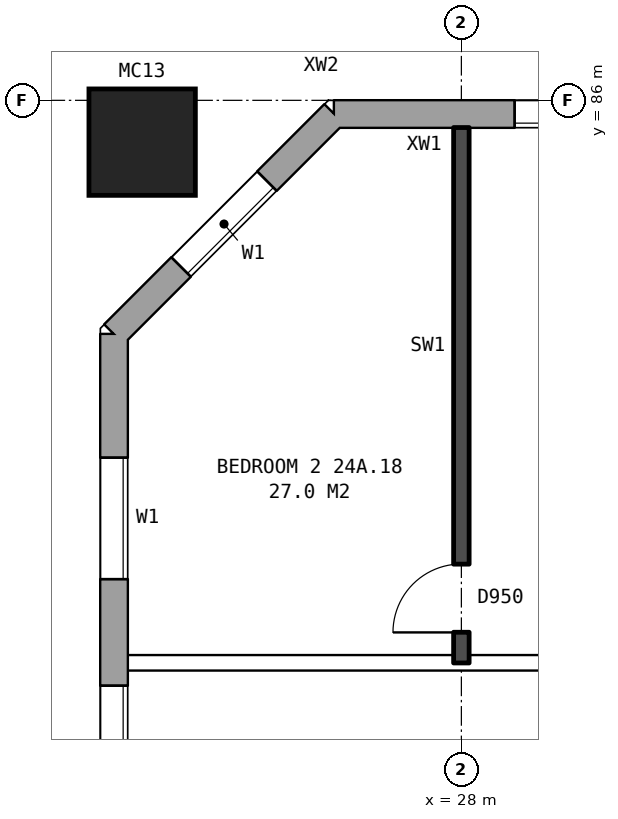
"""IFC4 building model, lengths in metres.
Left out: names, types, materials, properties, quantities, classifications, styles, units other than length and angle.
Written with IfcOpenShell. Run it as: python <this file> out.ifc"""

import sys

from ifc_helpers import new_model, si_unit, direction, frame, frame_2d, origin, origin_2d, place, context, subcontext, project, spatial, rectangle, hollow_rectangle, extrude, element, fill, save


model = new_model("IFC4")
c1 = context("Model", 3, precision=1e-05, world=origin(), true_north=direction((0.0, 1.0)))
c2 = subcontext(c1, "Body", "Model", "MODEL_VIEW")
j1 = project(units=[si_unit("LENGTHUNIT", "METRE"), si_unit("PLANEANGLEUNIT", "RADIAN")], contexts=[c1])
p1 = place(None, origin())
s1 = spatial("IfcSite", under=j1, at=p1, CompositionType="ELEMENT")
p2 = place(p1, origin())
s2 = spatial("IfcBuilding", under=s1, at=p2, CompositionType="ELEMENT")
p3 = place(p2, frame((0.0, 0.0, 87.1)))
s3 = spatial("IfcBuildingStorey", under=s2, at=p3, CompositionType="ELEMENT", Elevation=87.1)
p4 = place(p3, frame((23.8, 85.45, 0.0), z_axis=(0.0, 0.0, 1.0), x_axis=(1.0, 0.0, 0.0)))
e1 = element("IfcColumn", 1, at=p4, inside=s3, PredefinedType="COLUMN", context=c2, shape_type="SweptSolid", body=[
    extrude(hollow_rectangle(XDim=1.4, YDim=1.4, WallThickness=0.075, at=origin_2d()), origin(), (0.0, 0.0, 1.0), 3.1),
])
p5 = place(p3, frame((72.925, 85.82, 0.0), z_axis=(0.0, 0.0, 1.0), x_axis=(-1.0, 0.0, 0.0)))
e2 = element("IfcWall", 2, at=p5, inside=s3, PredefinedType="STANDARD", context=c2, shape_type="SweptSolid", body=[
    extrude(rectangle(XDim=46.601, YDim=0.36, at=frame_2d((23.3, 0.0))), origin(), (0.0, 0.0, 1.0), 2.85),
])
p6 = place(p5, frame((0.625, 0.0, 0.8)))
e3 = element("IfcOpeningElement", 3, at=p6, cuts=e2, PredefinedType="OPENING", context=c2, shape_type="SweptSolid", body=[
    extrude(rectangle(XDim=1.6, YDim=1.8, at=frame_2d((0.8, 0.9))), frame((0.0, 0.19, 0.0), z_axis=(0.0, -1.0, 0.0), x_axis=(1.0, 0.0, 0.0)), (0.0, 0.0, 1.0), 0.38),
])
p7 = place(p5, frame((3.625, 0.0, 0.8)))
e4 = element("IfcOpeningElement", 4, at=p7, cuts=e2, PredefinedType="OPENING", context=c2, shape_type="SweptSolid", body=[
    extrude(rectangle(XDim=1.6, YDim=1.8, at=frame_2d((0.8, 0.9))), frame((0.0, 0.19, 0.0), z_axis=(0.0, -1.0, 0.0), x_axis=(1.0, 0.0, 0.0)), (0.0, 0.0, 1.0), 0.38),
])
p8 = place(p5, frame((6.625, 0.0, 0.8)))
e5 = element("IfcOpeningElement", 5, at=p8, cuts=e2, PredefinedType="OPENING", context=c2, shape_type="SweptSolid", body=[
    extrude(rectangle(XDim=1.6, YDim=1.8, at=frame_2d((0.8, 0.9))), frame((0.0, 0.19, 0.0), z_axis=(0.0, -1.0, 0.0), x_axis=(1.0, 0.0, 0.0)), (0.0, 0.0, 1.0), 0.38),
])
p9 = place(p5, frame((9.625, 0.0, 0.8)))
e6 = element("IfcOpeningElement", 6, at=p9, cuts=e2, PredefinedType="OPENING", context=c2, shape_type="SweptSolid", body=[
    extrude(rectangle(XDim=1.6, YDim=1.8, at=frame_2d((0.8, 0.9))), frame((0.0, 0.19, 0.0), z_axis=(0.0, -1.0, 0.0), x_axis=(1.0, 0.0, 0.0)), (0.0, 0.0, 1.0), 0.38),
])
p10 = place(p5, frame((12.625, 0.0, 0.8)))
e7 = element("IfcOpeningElement", 7, at=p10, cuts=e2, PredefinedType="OPENING", context=c2, shape_type="SweptSolid", body=[
    extrude(rectangle(XDim=1.6, YDim=1.8, at=frame_2d((0.8, 0.9))), frame((0.0, 0.19, 0.0), z_axis=(0.0, -1.0, 0.0), x_axis=(1.0, 0.0, 0.0)), (0.0, 0.0, 1.0), 0.38),
])
p11 = place(p5, frame((15.625, 0.0, 0.8)))
e8 = element("IfcOpeningElement", 8, at=p11, cuts=e2, PredefinedType="OPENING", context=c2, shape_type="SweptSolid", body=[
    extrude(rectangle(XDim=1.6, YDim=1.8, at=frame_2d((0.8, 0.9))), frame((0.0, 0.19, 0.0), z_axis=(0.0, -1.0, 0.0), x_axis=(1.0, 0.0, 0.0)), (0.0, 0.0, 1.0), 0.38),
])
p12 = place(p5, frame((18.625, 0.0, 0.8)))
e9 = element("IfcOpeningElement", 9, at=p12, cuts=e2, PredefinedType="OPENING", context=c2, shape_type="SweptSolid", body=[
    extrude(rectangle(XDim=1.6, YDim=1.8, at=frame_2d((0.8, 0.9))), frame((0.0, 0.19, 0.0), z_axis=(0.0, -1.0, 0.0), x_axis=(1.0, 0.0, 0.0)), (0.0, 0.0, 1.0), 0.38),
])
p13 = place(p5, frame((22.025, 0.0, 0.15)))
e10 = element("IfcOpeningElement", 10, at=p13, cuts=e2, PredefinedType="OPENING", context=c2, shape_type="SweptSolid", body=[
    extrude(rectangle(XDim=0.6, YDim=0.9, at=frame_2d((0.3, 0.45))), frame((0.0, 0.19, 0.0), z_axis=(0.0, -1.0, 0.0), x_axis=(1.0, 0.0, 0.0)), (0.0, 0.0, 1.0), 0.38),
])
p14 = place(p5, frame((25.475, 0.0, 1.4)))
e11 = element("IfcOpeningElement", 11, at=p14, cuts=e2, PredefinedType="OPENING", context=c2, shape_type="SweptSolid", body=[
    extrude(rectangle(XDim=1.2, YDim=1.2, at=frame_2d((0.6, 0.6))), frame((0.0, 0.19, 0.0), z_axis=(0.0, -1.0, 0.0), x_axis=(1.0, 0.0, 0.0)), (0.0, 0.0, 1.0), 0.38),
])
p15 = place(p5, frame((27.625, 0.0, 0.8)))
e12 = element("IfcOpeningElement", 12, at=p15, cuts=e2, PredefinedType="OPENING", context=c2, shape_type="SweptSolid", body=[
    extrude(rectangle(XDim=1.6, YDim=1.8, at=frame_2d((0.8, 0.9))), frame((0.0, 0.19, 0.0), z_axis=(0.0, -1.0, 0.0), x_axis=(1.0, 0.0, 0.0)), (0.0, 0.0, 1.0), 0.38),
])
p16 = place(p5, frame((30.625, 0.0, 0.8)))
e13 = element("IfcOpeningElement", 13, at=p16, cuts=e2, PredefinedType="OPENING", context=c2, shape_type="SweptSolid", body=[
    extrude(rectangle(XDim=1.6, YDim=1.8, at=frame_2d((0.8, 0.9))), frame((0.0, 0.19, 0.0), z_axis=(0.0, -1.0, 0.0), x_axis=(1.0, 0.0, 0.0)), (0.0, 0.0, 1.0), 0.38),
])
p17 = place(p5, frame((33.625, 0.0, 0.8)))
e14 = element("IfcOpeningElement", 14, at=p17, cuts=e2, PredefinedType="OPENING", context=c2, shape_type="SweptSolid", body=[
    extrude(rectangle(XDim=1.6, YDim=1.8, at=frame_2d((0.8, 0.9))), frame((0.0, 0.19, 0.0), z_axis=(0.0, -1.0, 0.0), x_axis=(1.0, 0.0, 0.0)), (0.0, 0.0, 1.0), 0.38),
])
p18 = place(p5, frame((36.625, 0.0, 0.8)))
e15 = element("IfcOpeningElement", 15, at=p18, cuts=e2, PredefinedType="OPENING", context=c2, shape_type="SweptSolid", body=[
    extrude(rectangle(XDim=1.6, YDim=1.8, at=frame_2d((0.8, 0.9))), frame((0.0, 0.19, 0.0), z_axis=(0.0, -1.0, 0.0), x_axis=(1.0, 0.0, 0.0)), (0.0, 0.0, 1.0), 0.38),
])
p19 = place(p5, frame((39.625, 0.0, 0.8)))
e16 = element("IfcOpeningElement", 16, at=p19, cuts=e2, PredefinedType="OPENING", context=c2, shape_type="SweptSolid", body=[
    extrude(rectangle(XDim=1.6, YDim=1.8, at=frame_2d((0.8, 0.9))), frame((0.0, 0.19, 0.0), z_axis=(0.0, -1.0, 0.0), x_axis=(1.0, 0.0, 0.0)), (0.0, 0.0, 1.0), 0.38),
])
p20 = place(p5, frame((42.625, 0.0, 0.8)))
e17 = element("IfcOpeningElement", 17, at=p20, cuts=e2, PredefinedType="OPENING", context=c2, shape_type="SweptSolid", body=[
    extrude(rectangle(XDim=1.6, YDim=1.8, at=frame_2d((0.8, 0.9))), frame((0.0, 0.19, 0.0), z_axis=(0.0, -1.0, 0.0), x_axis=(1.0, 0.0, 0.0)), (0.0, 0.0, 1.0), 0.38),
])
p21 = place(p5, frame((22.925, 0.0, 0.25)))
e18 = element("IfcOpeningElement", 18, at=p21, cuts=e2, PredefinedType="OPENING", context=c2, shape_type="SweptSolid", body=[
    extrude(rectangle(XDim=0.8, YDim=1.5, at=frame_2d((0.4, 0.75))), frame((0.0, 0.19, 0.0), z_axis=(0.0, -1.0, 0.0), x_axis=(1.0, 0.0, 0.0)), (0.0, 0.0, 1.0), 0.38),
])
p22 = place(p3, frame((26.325, 85.82, 0.0), z_axis=(0.0, 0.0, 1.0), x_axis=(-0.707106781187, -0.707106781187, 0.0)))
e19 = element("IfcWall", 19, at=p22, inside=s3, PredefinedType="STANDARD", context=c2, shape_type="SweptSolid", body=[
    extrude(rectangle(XDim=4.094, YDim=0.36, at=frame_2d((2.047, 0.0))), origin(), (0.0, 0.0, 1.0), 2.85),
])
p23 = place(p22, frame((1.247, 0.0, 0.8)))
e20 = element("IfcOpeningElement", 20, at=p23, cuts=e19, PredefinedType="OPENING", context=c2, shape_type="SweptSolid", body=[
    extrude(rectangle(XDim=1.6, YDim=1.8, at=frame_2d((0.8, 0.9))), frame((0.0, 0.19, 0.0), z_axis=(0.0, -1.0, 0.0), x_axis=(1.0, 0.0, 0.0)), (0.0, 0.0, 1.0), 0.38),
])
p24 = place(p3, frame((23.43, 82.925, 0.0), z_axis=(0.0, 0.0, 1.0), x_axis=(0.0, -1.0, 0.0)))
e21 = element("IfcWall", 21, at=p24, inside=s3, PredefinedType="STANDARD", context=c2, shape_type="SweptSolid", body=[
    extrude(rectangle(XDim=25.851, YDim=0.36, at=frame_2d((12.925, 0.0))), origin(), (0.0, 0.0, 1.0), 2.85),
])
p25 = place(p24, frame((1.625, 0.0, 0.8)))
e22 = element("IfcOpeningElement", 22, at=p25, cuts=e21, PredefinedType="OPENING", context=c2, shape_type="SweptSolid", body=[
    extrude(rectangle(XDim=1.6, YDim=1.8, at=frame_2d((0.8, 0.9))), frame((0.0, 0.19, 0.0), z_axis=(0.0, -1.0, 0.0), x_axis=(1.0, 0.0, 0.0)), (0.0, 0.0, 1.0), 0.38),
])
p26 = place(p24, frame((4.625, 0.0, 0.8)))
e23 = element("IfcOpeningElement", 23, at=p26, cuts=e21, PredefinedType="OPENING", context=c2, shape_type="SweptSolid", body=[
    extrude(rectangle(XDim=1.6, YDim=1.8, at=frame_2d((0.8, 0.9))), frame((0.0, 0.19, 0.0), z_axis=(0.0, -1.0, 0.0), x_axis=(1.0, 0.0, 0.0)), (0.0, 0.0, 1.0), 0.38),
])
p27 = place(p24, frame((7.625, 0.0, 0.8)))
e24 = element("IfcOpeningElement", 24, at=p27, cuts=e21, PredefinedType="OPENING", context=c2, shape_type="SweptSolid", body=[
    extrude(rectangle(XDim=1.6, YDim=1.8, at=frame_2d((0.8, 0.9))), frame((0.0, 0.19, 0.0), z_axis=(0.0, -1.0, 0.0), x_axis=(1.0, 0.0, 0.0)), (0.0, 0.0, 1.0), 0.38),
])
p28 = place(p24, frame((10.625, 0.0, 0.8)))
e25 = element("IfcOpeningElement", 25, at=p28, cuts=e21, PredefinedType="OPENING", context=c2, shape_type="SweptSolid", body=[
    extrude(rectangle(XDim=1.6, YDim=1.8, at=frame_2d((0.8, 0.9))), frame((0.0, 0.19, 0.0), z_axis=(0.0, -1.0, 0.0), x_axis=(1.0, 0.0, 0.0)), (0.0, 0.0, 1.0), 0.38),
])
p29 = place(p24, frame((13.625, 0.0, 0.8)))
e26 = element("IfcOpeningElement", 26, at=p29, cuts=e21, PredefinedType="OPENING", context=c2, shape_type="SweptSolid", body=[
    extrude(rectangle(XDim=1.6, YDim=1.8, at=frame_2d((0.8, 0.9))), frame((0.0, 0.19, 0.0), z_axis=(0.0, -1.0, 0.0), x_axis=(1.0, 0.0, 0.0)), (0.0, 0.0, 1.0), 0.38),
])
p30 = place(p24, frame((16.625, 0.0, 0.8)))
e27 = element("IfcOpeningElement", 27, at=p30, cuts=e21, PredefinedType="OPENING", context=c2, shape_type="SweptSolid", body=[
    extrude(rectangle(XDim=1.6, YDim=1.8, at=frame_2d((0.8, 0.9))), frame((0.0, 0.19, 0.0), z_axis=(0.0, -1.0, 0.0), x_axis=(1.0, 0.0, 0.0)), (0.0, 0.0, 1.0), 0.38),
])
p31 = place(p24, frame((19.625, 0.0, 0.8)))
e28 = element("IfcOpeningElement", 28, at=p31, cuts=e21, PredefinedType="OPENING", context=c2, shape_type="SweptSolid", body=[
    extrude(rectangle(XDim=1.6, YDim=1.8, at=frame_2d((0.8, 0.9))), frame((0.0, 0.19, 0.0), z_axis=(0.0, -1.0, 0.0), x_axis=(1.0, 0.0, 0.0)), (0.0, 0.0, 1.0), 0.38),
])
p32 = place(p24, frame((22.625, 0.0, 0.8)))
e29 = element("IfcOpeningElement", 29, at=p32, cuts=e21, PredefinedType="OPENING", context=c2, shape_type="SweptSolid", body=[
    extrude(rectangle(XDim=1.6, YDim=1.8, at=frame_2d((0.8, 0.9))), frame((0.0, 0.19, 0.0), z_axis=(0.0, -1.0, 0.0), x_axis=(1.0, 0.0, 0.0)), (0.0, 0.0, 1.0), 0.38),
])
p33 = place(p3, frame((23.61, 78.6, 0.0), z_axis=(0.0, 0.0, 1.0), x_axis=(1.0, 0.0, 0.0)))
e30 = element("IfcWall", 30, at=p33, inside=s3, PredefinedType="PARTITIONING", context=c2, shape_type="SweptSolid", body=[
    extrude(rectangle(XDim=22.29, YDim=0.2, at=frame_2d((11.145, 0.0))), origin(), (0.0, 0.0, 1.0), 2.85),
])
p34 = place(p33, frame((18.84, 0.0, 0.0)))
e31 = element("IfcOpeningElement", 31, at=p34, cuts=e30, PredefinedType="OPENING", context=c2, shape_type="SweptSolid", body=[
    extrude(rectangle(XDim=1.0, YDim=2.1, at=frame_2d((0.5, 1.05))), frame((0.0, 0.11, 0.0), z_axis=(0.0, -1.0, 0.0), x_axis=(1.0, 0.0, 0.0)), (0.0, 0.0, 1.0), 0.22),
])
p35 = place(p33, frame((6.89, 0.0, 0.0)))
e32 = element("IfcOpeningElement", 32, at=p35, cuts=e30, PredefinedType="OPENING", context=c2, shape_type="SweptSolid", body=[
    extrude(rectangle(XDim=1.0, YDim=2.1, at=frame_2d((0.5, 1.05))), frame((0.0, 0.11, 0.0), z_axis=(0.0, -1.0, 0.0), x_axis=(1.0, 0.0, 0.0)), (0.0, 0.0, 1.0), 0.22),
])
p36 = place(p3, frame((28.0, 78.6, 0.0), z_axis=(0.0, 0.0, 1.0), x_axis=(0.0, 1.0, 0.0)))
e33 = element("IfcWall", 33, at=p36, inside=s3, PredefinedType="SOLIDWALL", context=c2, shape_type="SweptSolid", body=[
    extrude(rectangle(XDim=7.04, YDim=0.2, at=frame_2d((3.52, 0.0))), origin(), (0.0, 0.0, 1.0), 2.85),
])
p37 = place(p36, frame((0.4, 0.0, 0.0)))
e34 = element("IfcOpeningElement", 34, at=p37, cuts=e33, PredefinedType="OPENING", context=c2, shape_type="SweptSolid", body=[
    extrude(rectangle(XDim=0.9, YDim=2.1, at=frame_2d((0.45, 1.05))), frame((0.0, 0.11, 0.0), z_axis=(0.0, -1.0, 0.0), x_axis=(1.0, 0.0, 0.0)), (0.0, 0.0, 1.0), 0.22),
])
p38 = place(p20, origin())
e35 = element("IfcWindow", 35, at=p38, inside=s3, PartitioningType="SINGLE_PANEL", PredefinedType="WINDOW", context=c2, shape_type="SweptSolid", body=[
    extrude(rectangle(XDim=1.6, YDim=1.8, at=frame_2d((0.8, 0.9))), frame((0.0, 0.15, 0.0), z_axis=(0.0, -1.0, 0.0), x_axis=(1.0, 0.0, 0.0)), (0.0, 0.0, 1.0), 0.06),
])
fill(e17, e35)
p39 = place(p23, origin())
e36 = element("IfcWindow", 36, at=p39, inside=s3, PartitioningType="SINGLE_PANEL", PredefinedType="WINDOW", context=c2, shape_type="SweptSolid", body=[
    extrude(rectangle(XDim=1.6, YDim=1.8, at=frame_2d((0.8, 0.9))), frame((0.0, 0.15, 0.0), z_axis=(0.0, -1.0, 0.0), x_axis=(1.0, 0.0, 0.0)), (0.0, 0.0, 1.0), 0.06),
])
fill(e20, e36)
p40 = place(p25, origin())
e37 = element("IfcWindow", 37, at=p40, inside=s3, PartitioningType="SINGLE_PANEL", PredefinedType="WINDOW", context=c2, shape_type="SweptSolid", body=[
    extrude(rectangle(XDim=1.6, YDim=1.8, at=frame_2d((0.8, 0.9))), frame((0.0, 0.15, 0.0), z_axis=(0.0, -1.0, 0.0), x_axis=(1.0, 0.0, 0.0)), (0.0, 0.0, 1.0), 0.06),
])
fill(e22, e37)
p41 = place(p26, origin())
e38 = element("IfcWindow", 38, at=p41, inside=s3, PartitioningType="SINGLE_PANEL", PredefinedType="WINDOW", context=c2, shape_type="SweptSolid", body=[
    extrude(rectangle(XDim=1.6, YDim=1.8, at=frame_2d((0.8, 0.9))), frame((0.0, 0.15, 0.0), z_axis=(0.0, -1.0, 0.0), x_axis=(1.0, 0.0, 0.0)), (0.0, 0.0, 1.0), 0.06),
])
fill(e23, e38)
p42 = place(p37, origin())
e39 = element("IfcDoor", 39, at=p42, inside=s3, OperationType="SINGLE_SWING_LEFT", PredefinedType="DOOR", context=c2, shape_type="SweptSolid", body=[
    extrude(rectangle(XDim=0.9, YDim=2.1, at=frame_2d((0.45, 1.05))), frame((0.0, 0.025, 0.0), z_axis=(0.0, -1.0, 0.0), x_axis=(1.0, 0.0, 0.0)), (0.0, 0.0, 1.0), 0.05),
])
fill(e34, e39)
save(model, sys.argv[1])
